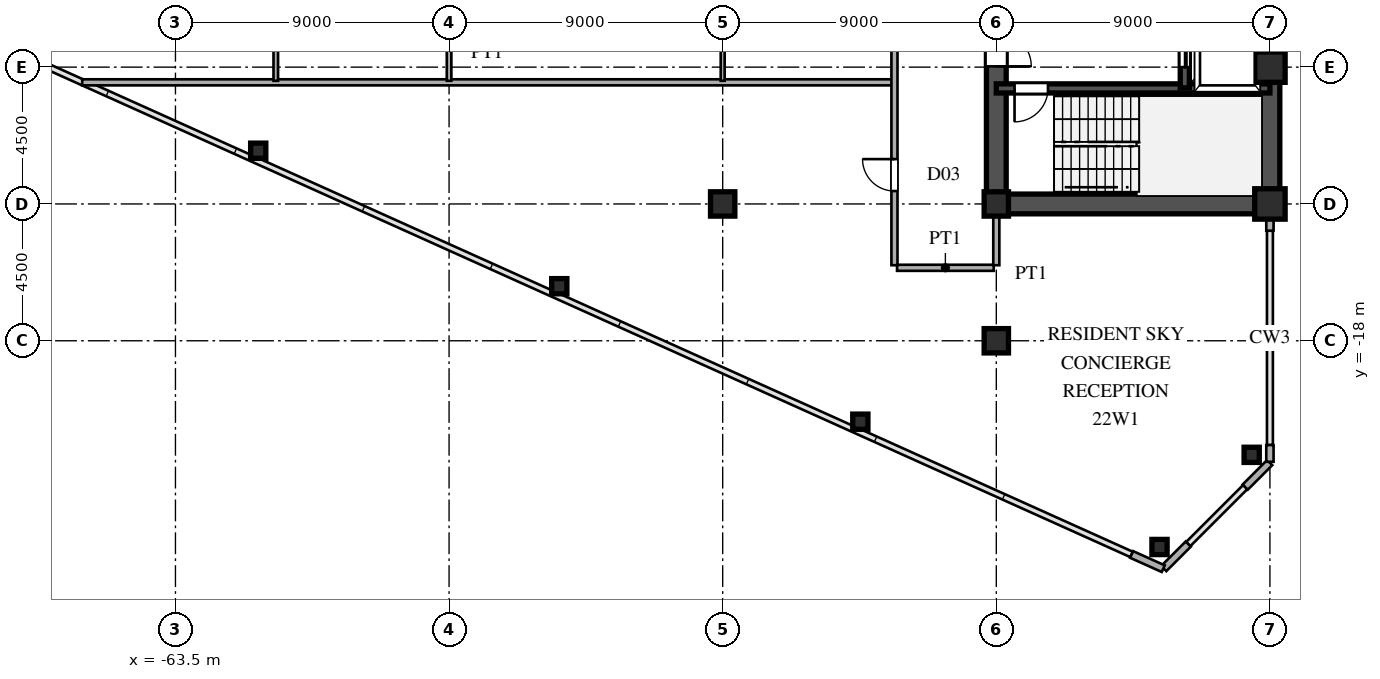
"""IFC4 building model, lengths in metres.
Left out: names, types, materials, properties, quantities, classifications, styles, units other than length and angle.
Written with IfcOpenShell. Run it as: python <this file> out.ifc"""

import sys

from ifc_helpers import new_model, si_unit, direction, frame, frame_2d, origin, origin_2d, place, context, subcontext, project, spatial, rectangle, hollow_rectangle, i_section, extrude, source, transform, mapped, element, fill, save


model = new_model("IFC4")
c1 = context("Model", 3, precision=1e-05, world=origin(), true_north=direction((0.0, 1.0)))
c2 = subcontext(c1, "Body", "Model", "MODEL_VIEW")
j1 = project(units=[si_unit("LENGTHUNIT", "METRE"), si_unit("PLANEANGLEUNIT", "RADIAN")], contexts=[c1])
p1 = place(None, origin())
s1 = spatial("IfcSite", under=j1, at=p1, CompositionType="ELEMENT")
p2 = place(p1, origin())
s2 = spatial("IfcBuilding", under=s1, at=p2, CompositionType="ELEMENT")
p3 = place(p2, frame((0.0, 0.0, 83.7)))
s3 = spatial("IfcBuildingStorey", under=s2, at=p3, CompositionType="ELEMENT", Elevation=83.7)
m1 = source(origin(), c2, "Body", "SweptSolid", [
    extrude(hollow_rectangle(XDim=1.0, YDim=1.0, WallThickness=0.042, at=origin_2d()), origin(), (0.0, 0.0, 1.0), 3.6),
])
for number, where, z_axis, x_axis in (
    (1, (-27.5, -13.5, 0.0), (0.0, 0.0, 1.0), (1.0, 0.0, 0.0)),
    (2, (-27.5, -9.0, 0.0), (0.0, 0.0, 1.0), (1.0, 0.0, 0.0)),
):
    element("IfcColumn", number, at=place(p3, frame(where, z_axis=z_axis, x_axis=x_axis)), inside=s3, PredefinedType="COLUMN", context=c2, shape_type="MappedRepresentation", body=[
        mapped(m1, transform((0.0, 0.0, 0.0), scale=1.0)),
    ])
m2 = source(origin(), c2, "Body", "SweptSolid", [
    extrude(i_section(OverallWidth=0.8, OverallDepth=0.8, WebThickness=0.032, FlangeThickness=0.05, at=origin_2d()), origin(), (0.0, 0.0, 1.0), 3.6),
])
for number, where, z_axis, x_axis in (
    (3, (-36.5, -18.0, 0.0), (0.0, 0.0, 1.0), (1.0, 0.0, 0.0)),
    (4, (-36.5, -13.5, 0.0), (0.0, 0.0, 1.0), (1.0, 0.0, 0.0)),
    (5, (-45.5, -13.5, 0.0), (0.0, 0.0, 1.0), (1.0, 0.0, 0.0)),
):
    element("IfcColumn", number, at=place(p3, frame(where, z_axis=z_axis, x_axis=x_axis)), inside=s3, PredefinedType="COLUMN", context=c2, shape_type="MappedRepresentation", body=[
        mapped(m2, transform((0.0, 0.0, 0.0), scale=1.0)),
    ])
m3 = source(origin(), c2, "Body", "SweptSolid", [
    extrude(hollow_rectangle(XDim=0.5, YDim=0.5, WallThickness=0.02, at=origin_2d()), origin(), (0.0, 0.0, 1.0), 3.6),
])
for number, where, z_axis, x_axis in (
    (6, (-28.1, -21.751, 0.0), (0.0, 0.0, 1.0), (1.0, 0.0, 0.0)),
    (7, (-31.131, -24.783, 0.0), (0.0, 0.0, 1.0), (1.0, 0.0, 0.0)),
    (8, (-40.973, -20.661, 0.0), (0.0, 0.0, 1.0), (1.0, 0.0, 0.0)),
    (9, (-50.875, -16.205, 0.0), (0.0, 0.0, 1.0), (1.0, 0.0, 0.0)),
    (10, (-60.778, -11.749, 0.0), (0.0, 0.0, 1.0), (1.0, 0.0, 0.0)),
):
    element("IfcColumn", number, at=place(p3, frame(where, z_axis=z_axis, x_axis=x_axis)), inside=s3, PredefinedType="COLUMN", context=c2, shape_type="MappedRepresentation", body=[
        mapped(m3, transform((0.0, 0.0, 0.0), scale=1.0)),
    ])
p4 = place(p3, frame((-27.5, -21.98, 0.0), z_axis=(0.0, 0.0, 1.0), x_axis=(0.0, 1.0, 0.0)))
e11 = element("IfcWall", 11, at=p4, inside=s3, PredefinedType="SOLIDWALL", context=c2, shape_type="SweptSolid", body=[
    extrude(rectangle(XDim=0.55, YDim=0.24, at=frame_2d((0.275, 0.0))), origin(), (0.0, 0.0, 1.0), 3.34),
])
p5 = place(p3, frame((-27.5, -14.38, 0.0), z_axis=(0.0, 0.0, 1.0), x_axis=(0.0, 1.0, 0.0)))
e12 = element("IfcWall", 12, at=p5, inside=s3, PredefinedType="SOLIDWALL", context=c2, shape_type="SweptSolid", body=[
    extrude(rectangle(XDim=0.55, YDim=0.24, at=frame_2d((0.275, 0.0))), origin(), (0.0, 0.0, 1.0), 2.84),
])
p6 = place(p3, frame((-32.049, -25.028, 0.0), z_axis=(0.0, 0.0, 1.0), x_axis=(0.911929519623, -0.410346866979, 0.0)))
e13 = element("IfcWall", 13, at=p6, inside=s3, PredefinedType="SOLIDWALL", context=c2, shape_type="SweptSolid", body=[
    extrude(rectangle(XDim=1.14, YDim=0.24, at=frame_2d((0.57, 0.0))), origin(), (0.0, 0.0, 1.0), 3.34),
])
for number, where, z_axis, x_axis in (
    (14, (-30.993, -25.493, 0.0), (0.0, 0.0, 1.0), (0.707, 0.707, 0.0)),
    (15, (-28.313, -22.813, 0.0), (0.0, 0.0, 1.0), (0.707, 0.707, 0.0)),
):
    element("IfcWall", number, at=place(p3, frame(where, z_axis=z_axis, x_axis=x_axis)), inside=s3, PredefinedType="SOLIDWALL", context=c2, shape_type="SweptSolid", body=[
        extrude(rectangle(XDim=1.14, YDim=0.24, at=frame_2d((0.57, 0.0))), origin(), (0.0, 0.0, 1.0), 3.34),
    ])
p7 = place(p3, frame((-27.5, -13.5, 0.0), z_axis=(0.0, 0.0, 1.0), x_axis=(0.0, 1.0, 0.0)))
e16 = element("IfcWall", 16, at=p7, inside=s3, PredefinedType="SHEAR", context=c2, shape_type="SweptSolid", body=[
    extrude(rectangle(XDim=12.2, YDim=0.65, at=frame_2d((6.1, 0.0))), origin(), (0.0, 0.0, 1.0), 3.34),
])
p8 = place(p3, frame((-36.5, -13.5, 0.0), z_axis=(0.0, 0.0, 1.0), x_axis=(1.0, 0.0, 0.0)))
e17 = element("IfcWall", 17, at=p8, inside=s3, PredefinedType="SHEAR", context=c2, shape_type="SweptSolid", body=[
    extrude(rectangle(XDim=9.0, YDim=0.65, at=frame_2d((4.5, 0.0))), origin(), (0.0, 0.0, 1.0), 3.34),
])
p9 = place(p3, frame((-36.5, -13.65, 0.0), z_axis=(0.0, 0.0, 1.0), x_axis=(0.0, 1.0, 0.0)))
e18 = element("IfcWall", 18, at=p9, inside=s3, PredefinedType="SHEAR", context=c2, shape_type="SweptSolid", body=[
    extrude(rectangle(XDim=7.15, YDim=0.65, at=frame_2d((3.575, 0.0))), origin(), (0.0, 0.0, 1.0), 3.34),
])
p10 = place(p9, frame((4.675, 0.0, 0.0)))
e19 = element("IfcOpeningElement", 19, at=p10, cuts=e18, PredefinedType="OPENING", context=c2, shape_type="SweptSolid", body=[
    extrude(rectangle(XDim=1.15, YDim=2.2, at=frame_2d((0.575, 1.1))), frame((0.0, 0.335, 0.0), z_axis=(0.0, -1.0, 0.0), x_axis=(1.0, 0.0, 0.0)), (0.0, 0.0, 1.0), 0.67),
])
p11 = place(p3, frame((-36.5, -9.7, 0.0), z_axis=(0.0, 0.0, 1.0), x_axis=(1.0, 0.0, 0.0)))
e20 = element("IfcWall", 20, at=p11, inside=s3, PredefinedType="SHEAR", context=c2, shape_type="SweptSolid", body=[
    extrude(rectangle(XDim=9.0, YDim=0.3, at=frame_2d((4.5, 0.0))), origin(), (0.0, 0.0, 1.0), 3.34),
])
p12 = place(p11, frame((0.6, 0.0, 0.0)))
e21 = element("IfcOpeningElement", 21, at=p12, cuts=e20, PredefinedType="OPENING", context=c2, shape_type="SweptSolid", body=[
    extrude(rectangle(XDim=1.1, YDim=2.2, at=frame_2d((0.55, 1.1))), frame((0.0, 0.16, 0.0), z_axis=(0.0, -1.0, 0.0), x_axis=(1.0, 0.0, 0.0)), (0.0, 0.0, 1.0), 0.32),
])
p13 = place(p3, frame((-30.3, -9.68, 0.0), z_axis=(0.0, 0.0, 1.0), x_axis=(0.0, 1.0, 0.0)))
e22 = element("IfcWall", 22, at=p13, inside=s3, PredefinedType="SHEAR", context=c2, shape_type="SweptSolid", body=[
    extrude(rectangle(XDim=2.56, YDim=0.3, at=frame_2d((1.28, 0.0))), origin(), (0.0, 0.0, 1.0), 3.34),
])
p14 = place(p13, frame((0.68, 0.0, 0.0)))
e23 = element("IfcOpeningElement", 23, at=p14, cuts=e22, PredefinedType="OPENING", context=c2, shape_type="SweptSolid", body=[
    extrude(rectangle(XDim=1.2, YDim=2.25, at=frame_2d((0.6, 1.125))), frame((0.0, 0.16, 0.0), z_axis=(0.0, -1.0, 0.0), x_axis=(1.0, 0.0, 0.0)), (0.0, 0.0, 1.0), 0.32),
])
p15 = place(p3, frame((-39.765, -15.6, 0.0), z_axis=(0.0, 0.0, 1.0), x_axis=(1.0, 0.0, 0.0)))
e24 = element("IfcWall", 24, at=p15, inside=s3, PredefinedType="PARTITIONING", context=c2, shape_type="SweptSolid", body=[
    extrude(rectangle(XDim=3.18, YDim=0.2, at=frame_2d((1.59, 0.0))), origin(), (0.0, 0.0, 1.0), 3.34),
])
p16 = place(p3, frame((-66.568, -9.5, 0.0), z_axis=(0.0, 0.0, 1.0), x_axis=(1.0, 0.0, 0.0)))
e25 = element("IfcWall", 25, at=p16, inside=s3, PredefinedType="PARTITIONING", context=c2, shape_type="SweptSolid", body=[
    extrude(rectangle(XDim=26.638, YDim=0.2, at=frame_2d((13.319, 0.0))), origin(), (0.0, 0.0, 1.0), 3.34),
])
p17 = place(p3, frame((-60.2, -9.45, 0.0), z_axis=(0.0, 0.0, 1.0), x_axis=(0.0, 1.0, 0.0)))
e26 = element("IfcWall", 26, at=p17, inside=s3, PredefinedType="PARTITIONING", context=c2, shape_type="SweptSolid", body=[
    extrude(rectangle(XDim=18.725, YDim=0.15, at=frame_2d((9.362, 0.0))), origin(), (0.0, 0.0, 1.0), 3.34),
])
p18 = place(p17, frame((1.808, 0.0, 0.0)))
e27 = element("IfcOpeningElement", 27, at=p18, cuts=e26, PredefinedType="OPENING", context=c2, shape_type="SweptSolid", body=[
    extrude(rectangle(XDim=0.95, YDim=2.15, at=frame_2d((0.475, 1.075))), frame((0.0, 0.085, 0.0), z_axis=(0.0, -1.0, 0.0), x_axis=(1.0, 0.0, 0.0)), (0.0, 0.0, 1.0), 0.17),
])
p19 = place(p17, frame((6.475, 0.0, 0.0)))
e28 = element("IfcOpeningElement", 28, at=p19, cuts=e26, PredefinedType="OPENING", context=c2, shape_type="SweptSolid", body=[
    extrude(rectangle(XDim=0.95, YDim=2.15, at=frame_2d((0.475, 1.075))), frame((0.0, 0.085, 0.0), z_axis=(0.0, -1.0, 0.0), x_axis=(1.0, 0.0, 0.0)), (0.0, 0.0, 1.0), 0.17),
])
p20 = place(p17, frame((11.142, 0.0, 0.0)))
e29 = element("IfcOpeningElement", 29, at=p20, cuts=e26, PredefinedType="OPENING", context=c2, shape_type="SweptSolid", body=[
    extrude(rectangle(XDim=0.95, YDim=2.15, at=frame_2d((0.475, 1.075))), frame((0.0, 0.085, 0.0), z_axis=(0.0, -1.0, 0.0), x_axis=(1.0, 0.0, 0.0)), (0.0, 0.0, 1.0), 0.17),
])
p21 = place(p17, frame((15.887, 0.0, 0.0)))
e30 = element("IfcOpeningElement", 30, at=p21, cuts=e26, PredefinedType="OPENING", context=c2, shape_type="SweptSolid", body=[
    extrude(rectangle(XDim=0.95, YDim=2.15, at=frame_2d((0.475, 1.075))), frame((0.0, 0.085, 0.0), z_axis=(0.0, -1.0, 0.0), x_axis=(1.0, 0.0, 0.0)), (0.0, 0.0, 1.0), 0.17),
])
p22 = place(p3, frame((-54.5, -9.45, 0.0), z_axis=(0.0, 0.0, 1.0), x_axis=(0.0, 1.0, 0.0)))
e31 = element("IfcWall", 31, at=p22, inside=s3, PredefinedType="PARTITIONING", context=c2, shape_type="SweptSolid", body=[
    extrude(rectangle(XDim=4.93, YDim=0.15, at=frame_2d((2.465, 0.0))), origin(), (0.0, 0.0, 1.0), 3.34),
])
p23 = place(p3, frame((-45.5, -9.45, 0.0), z_axis=(0.0, 0.0, 1.0), x_axis=(0.0, 1.0, 0.0)))
e32 = element("IfcWall", 32, at=p23, inside=s3, PredefinedType="PARTITIONING", context=c2, shape_type="SweptSolid", body=[
    extrude(rectangle(XDim=9.233, YDim=0.13, at=frame_2d((4.616, 0.0))), origin(), (0.0, 0.0, 1.0), 2.44),
])
p24 = place(p23, frame((6.475, 0.0, 0.0)))
e33 = element("IfcOpeningElement", 33, at=p24, cuts=e32, PredefinedType="OPENING", context=c2, shape_type="SweptSolid", body=[
    extrude(rectangle(XDim=0.95, YDim=2.15, at=frame_2d((0.475, 1.075))), frame((0.0, 0.075, 0.0), z_axis=(0.0, -1.0, 0.0), x_axis=(1.0, 0.0, 0.0)), (0.0, 0.0, 1.0), 0.15),
])
p25 = place(p3, frame((-39.85, -15.515, 0.0), z_axis=(0.0, 0.0, 1.0), x_axis=(0.0, 1.0, 0.0)))
e34 = element("IfcWall", 34, at=p25, inside=s3, PredefinedType="PARTITIONING", context=c2, shape_type="SweptSolid", body=[
    extrude(rectangle(XDim=31.03, YDim=0.2, at=frame_2d((15.515, 0.0))), origin(), (0.0, 0.0, 1.0), 3.34),
])
p26 = place(p25, frame((2.44, 0.0, 0.0)))
e35 = element("IfcOpeningElement", 35, at=p26, cuts=e34, PredefinedType="OPENING", context=c2, shape_type="SweptSolid", body=[
    extrude(rectangle(XDim=1.05, YDim=2.25, at=frame_2d((0.525, 1.125))), frame((0.0, 0.11, 0.0), z_axis=(0.0, -1.0, 0.0), x_axis=(1.0, 0.0, 0.0)), (0.0, 0.0, 1.0), 0.22),
])
p27 = place(p25, frame((12.28, 0.0, 0.0)))
e36 = element("IfcOpeningElement", 36, at=p27, cuts=e34, PredefinedType="OPENING", context=c2, shape_type="SweptSolid", body=[
    extrude(rectangle(XDim=1.05, YDim=2.25, at=frame_2d((0.525, 1.125))), frame((0.0, 0.11, 0.0), z_axis=(0.0, -1.0, 0.0), x_axis=(1.0, 0.0, 0.0)), (0.0, 0.0, 1.0), 0.22),
])
p28 = place(p25, frame((25.067, 0.0, 0.0)))
e37 = element("IfcOpeningElement", 37, at=p28, cuts=e34, PredefinedType="OPENING", context=c2, shape_type="SweptSolid", body=[
    extrude(rectangle(XDim=1.05, YDim=2.25, at=frame_2d((0.525, 1.125))), frame((0.0, 0.11, 0.0), z_axis=(0.0, -1.0, 0.0), x_axis=(1.0, 0.0, 0.0)), (0.0, 0.0, 1.0), 0.22),
])
p29 = place(p3, frame((-36.5, -15.515, 0.0), z_axis=(0.0, 0.0, 1.0), x_axis=(0.0, 1.0, 0.0)))
e38 = element("IfcWall", 38, at=p29, inside=s3, PredefinedType="PARTITIONING", context=c2, shape_type="SweptSolid", body=[
    extrude(rectangle(XDim=1.685, YDim=0.2, at=frame_2d((0.842, 0.0))), origin(), (0.0, 0.0, 1.0), 2.44),
])
m4 = source(origin(), c2, "Body", "SweptSolid", [
    extrude(rectangle(XDim=1.15, YDim=2.2, at=frame_2d((0.575, 1.1))), frame((0.0, 0.025, 0.0), z_axis=(0.0, -1.0, 0.0), x_axis=(1.0, 0.0, 0.0)), (0.0, 0.0, 1.0), 0.05),
])
p30 = place(p10, frame((1.15, 0.0, 0.0), z_axis=(0.0, 0.0, 1.0), x_axis=(-1.0, 0.0, 0.0)))
e39 = element("IfcDoor", 39, at=p30, inside=s3, OperationType="SINGLE_SWING_LEFT", PredefinedType="DOOR", context=c2, shape_type="MappedRepresentation", body=[
    mapped(m4, transform((0.0, 0.0, 0.0), scale=1.0)),
])
fill(e19, e39)
m5 = source(origin(), c2, "Body", "SweptSolid", [
    extrude(rectangle(XDim=1.1, YDim=2.2, at=frame_2d((0.55, 1.1))), frame((0.0, 0.025, 0.0), z_axis=(0.0, -1.0, 0.0), x_axis=(1.0, 0.0, 0.0)), (0.0, 0.0, 1.0), 0.05),
])
p31 = place(p12, frame((1.1, 0.0, 0.0), z_axis=(0.0, 0.0, 1.0), x_axis=(-1.0, 0.0, 0.0)))
e40 = element("IfcDoor", 40, at=p31, inside=s3, OperationType="SINGLE_SWING_LEFT", PredefinedType="DOOR", context=c2, shape_type="MappedRepresentation", body=[
    mapped(m5, transform((0.0, 0.0, 0.0), scale=1.0)),
])
fill(e21, e40)
m6 = source(origin(), c2, "Body", "SweptSolid", [
    extrude(rectangle(XDim=1.2, YDim=2.25, at=frame_2d((0.6, 1.125))), frame((0.0, 0.025, 0.0), z_axis=(0.0, -1.0, 0.0), x_axis=(1.0, 0.0, 0.0)), (0.0, 0.0, 1.0), 0.05),
])
p32 = place(p14, origin())
e41 = element("IfcDoor", 41, at=p32, inside=s3, OperationType="DOUBLE_DOOR_SLIDING", PredefinedType="DOOR", context=c2, shape_type="MappedRepresentation", body=[
    mapped(m6, transform((0.0, 0.0, 0.0), scale=1.0)),
])
fill(e23, e41)
m7 = source(origin(), c2, "Body", "SweptSolid", [
    extrude(rectangle(XDim=1.05, YDim=2.25, at=frame_2d((0.525, 1.125))), frame((0.0, 0.025, 0.0), z_axis=(0.0, -1.0, 0.0), x_axis=(1.0, 0.0, 0.0)), (0.0, 0.0, 1.0), 0.05),
])
p33 = place(p26, origin())
e42 = element("IfcDoor", 42, at=p33, inside=s3, OperationType="SINGLE_SWING_RIGHT", PredefinedType="DOOR", context=c2, shape_type="MappedRepresentation", body=[
    mapped(m7, transform((0.0, 0.0, 0.0), scale=1.0)),
])
fill(e35, e42)
save(model, sys.argv[1])
